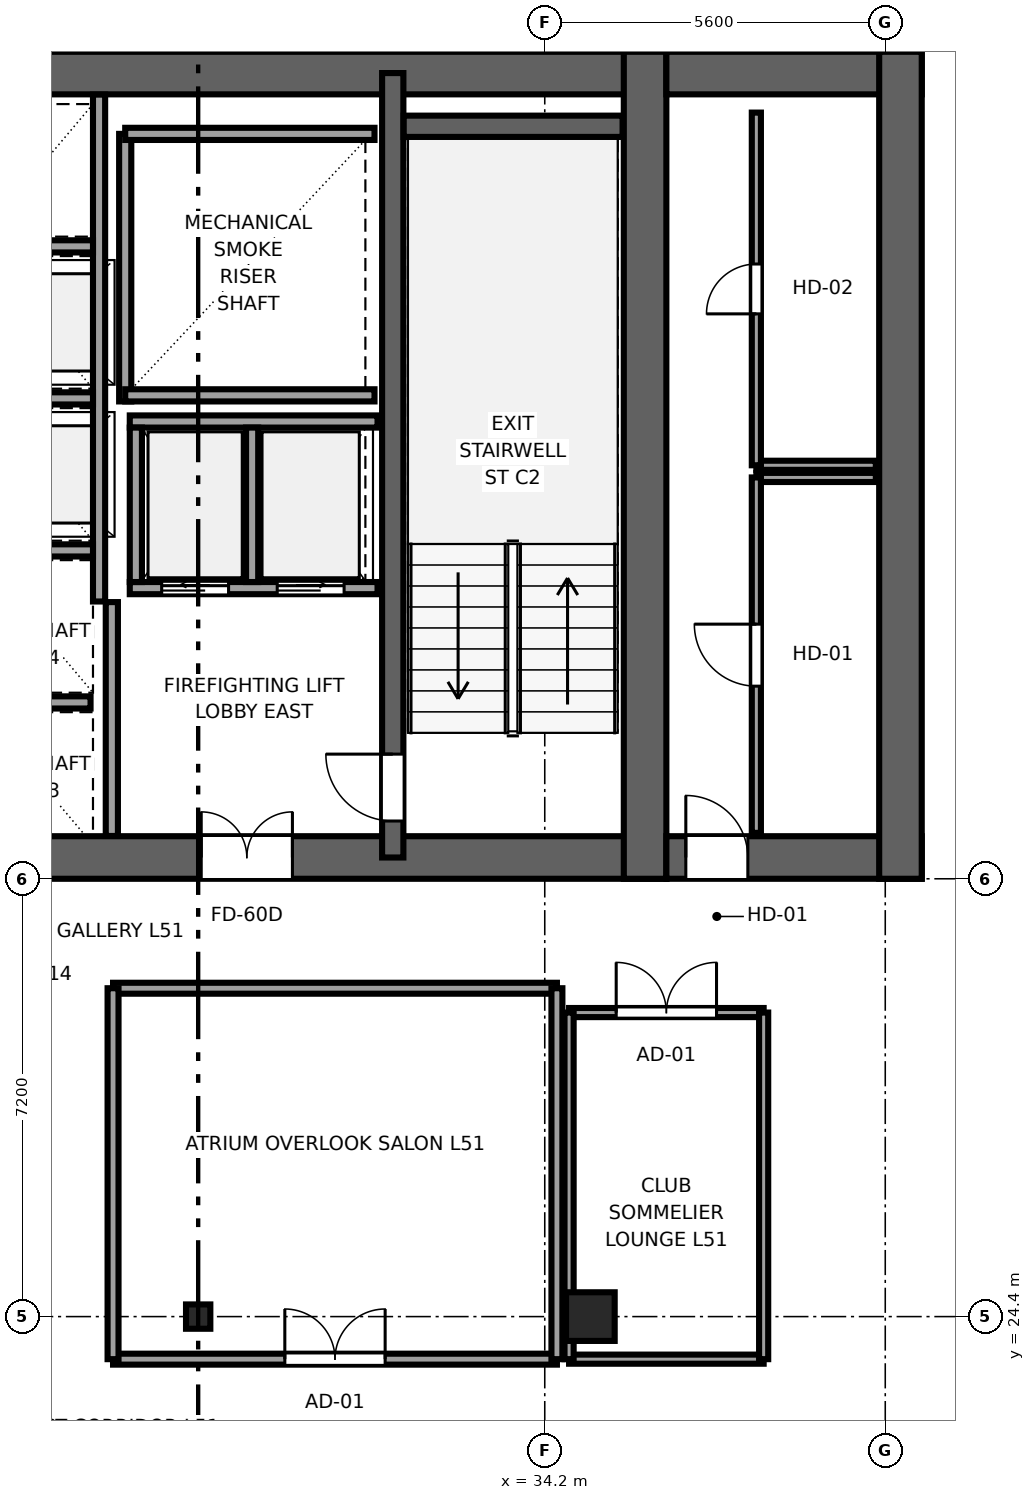
"""IFC4 building model, lengths in metres.
Left out: names, types, materials, properties, quantities, classifications, styles, units other than length and angle.
Written with IfcOpenShell. Run it as: python <this file> out.ifc"""

import sys

from ifc_helpers import new_model, si_unit, direction, frame, frame_2d, origin, origin_2d, place, context, subcontext, project, spatial, rectangle, i_section, extrude, source, transform, mapped, element, fill, save


model = new_model("IFC4")
c1 = context("Model", 3, precision=1e-05, world=origin(), true_north=direction((0.0, 1.0)))
c2 = subcontext(c1, "Body", "Model", "MODEL_VIEW")
j1 = project(units=[si_unit("LENGTHUNIT", "METRE"), si_unit("PLANEANGLEUNIT", "RADIAN")], contexts=[c1])
p1 = place(None, origin())
s1 = spatial("IfcSite", under=j1, at=p1, CompositionType="ELEMENT")
p2 = place(p1, origin())
s2 = spatial("IfcBuilding", under=s1, at=p2, CompositionType="ELEMENT")
p3 = place(p2, frame((0.0, 0.0, 194.65)))
s3 = spatial("IfcBuildingStorey", under=s2, at=p3, CompositionType="ELEMENT", Elevation=194.65)
p4 = place(p3, frame((9.8, 31.95, 0.0), z_axis=(0.0, 0.0, 1.0), x_axis=(1.0, 0.0, 0.0)))
e1 = element("IfcWall", 1, at=p4, inside=s3, PredefinedType="SHEAR", context=c2, shape_type="SweptSolid", body=[
    extrude(rectangle(XDim=26.4, YDim=0.7, at=frame_2d((13.2, 0.0))), origin(), (0.0, 0.0, 1.0), 3.55),
])
p5 = place(p4, frame((7.65, 0.0, 0.0), z_axis=(0.0, 0.0, 1.0), x_axis=(-1.0, 0.0, 0.0)))
e2 = element("IfcOpeningElement", 2, at=p5, cuts=e1, PredefinedType="OPENING", context=c2, shape_type="SweptSolid", body=[
    extrude(rectangle(XDim=1.5, YDim=2.04, at=frame_2d((0.75, 1.02))), frame((0.0, 0.36, 0.0), z_axis=(0.0, -1.0, 0.0), x_axis=(1.0, 0.0, 0.0)), (0.0, 0.0, 1.0), 0.72),
])
p6 = place(p4, frame((13.95, 0.0, 0.0), z_axis=(0.0, 0.0, 1.0), x_axis=(-1.0, 0.0, 0.0)))
e3 = element("IfcOpeningElement", 3, at=p6, cuts=e1, PredefinedType="OPENING", context=c2, shape_type="SweptSolid", body=[
    extrude(rectangle(XDim=1.5, YDim=2.04, at=frame_2d((0.75, 1.02))), frame((0.0, 0.36, 0.0), z_axis=(0.0, -1.0, 0.0), x_axis=(1.0, 0.0, 0.0)), (0.0, 0.0, 1.0), 0.72),
])
p7 = place(p4, frame((20.25, 0.0, 0.0), z_axis=(0.0, 0.0, 1.0), x_axis=(-1.0, 0.0, 0.0)))
e4 = element("IfcOpeningElement", 4, at=p7, cuts=e1, PredefinedType="OPENING", context=c2, shape_type="SweptSolid", body=[
    extrude(rectangle(XDim=1.5, YDim=2.04, at=frame_2d((0.75, 1.02))), frame((0.0, 0.36, 0.0), z_axis=(0.0, -1.0, 0.0), x_axis=(1.0, 0.0, 0.0)), (0.0, 0.0, 1.0), 0.72),
])
p8 = place(p3, frame((9.8, 44.85, 0.0), z_axis=(0.0, 0.0, 1.0), x_axis=(1.0, 0.0, 0.0)))
e5 = element("IfcWall", 5, at=p8, inside=s3, PredefinedType="SHEAR", context=c2, shape_type="SweptSolid", body=[
    extrude(rectangle(XDim=26.4, YDim=0.7, at=frame_2d((13.2, 0.0))), origin(), (0.0, 0.0, 1.0), 3.55),
])
p9 = place(p3, frame((35.85, 31.6, 0.0), z_axis=(0.0, 0.0, 1.0), x_axis=(0.0, 1.0, 0.0)))
e6 = element("IfcWall", 6, at=p9, inside=s3, PredefinedType="SHEAR", context=c2, shape_type="SweptSolid", body=[
    extrude(rectangle(XDim=13.6, YDim=0.7, at=frame_2d((6.8, 0.0))), origin(), (0.0, 0.0, 1.0), 3.55),
])
p10 = place(p3, frame((31.7, 31.95, 0.0), z_axis=(0.0, 0.0, 1.0), x_axis=(0.0, 1.0, 0.0)))
e7 = element("IfcWall", 7, at=p10, inside=s3, PredefinedType="SHEAR", context=c2, shape_type="SweptSolid", body=[
    extrude(rectangle(XDim=12.9, YDim=0.35, at=frame_2d((6.45, 0.0))), origin(), (0.0, 0.0, 1.0), 3.55),
])
p11 = place(p10, frame((1.7, 0.0, 0.0), z_axis=(0.0, 0.0, 1.0), x_axis=(-1.0, 0.0, 0.0)))
e8 = element("IfcOpeningElement", 8, at=p11, cuts=e7, PredefinedType="OPENING", context=c2, shape_type="SweptSolid", body=[
    extrude(rectangle(XDim=1.1, YDim=2.12, at=frame_2d((0.55, 1.06))), frame((0.0, 0.185, 0.0), z_axis=(0.0, -1.0, 0.0), x_axis=(1.0, 0.0, 0.0)), (0.0, 0.0, 1.0), 0.37),
])
p12 = place(p3, frame((36.2, 31.95, 0.0), z_axis=(0.0, 0.0, 1.0), x_axis=(1.0, 0.0, 0.0)))
e9 = element("IfcWall", 9, at=p12, inside=s3, PredefinedType="SHEAR", context=c2, shape_type="SweptSolid", body=[
    extrude(rectangle(XDim=4.2, YDim=0.7, at=frame_2d((2.1, 0.0))), origin(), (0.0, 0.0, 1.0), 3.55),
])
p13 = place(p12, frame((1.34, 0.0, 0.0), z_axis=(0.0, 0.0, 1.0), x_axis=(-1.0, 0.0, 0.0)))
e10 = element("IfcOpeningElement", 10, at=p13, cuts=e9, PredefinedType="OPENING", context=c2, shape_type="SweptSolid", body=[
    extrude(rectangle(XDim=1.02, YDim=2.03, at=frame_2d((0.51, 1.015))), frame((0.0, 0.36, 0.0), z_axis=(0.0, -1.0, 0.0), x_axis=(1.0, 0.0, 0.0)), (0.0, 0.0, 1.0), 0.72),
])
p14 = place(p3, frame((36.2, 44.85, 0.0), z_axis=(0.0, 0.0, 1.0), x_axis=(1.0, 0.0, 0.0)))
e11 = element("IfcWall", 11, at=p14, inside=s3, PredefinedType="SHEAR", context=c2, shape_type="SweptSolid", body=[
    extrude(rectangle(XDim=4.2, YDim=0.7, at=frame_2d((2.1, 0.0))), origin(), (0.0, 0.0, 1.0), 3.55),
])
p15 = place(p3, frame((40.05, 31.6, 0.0), z_axis=(0.0, 0.0, 1.0), x_axis=(0.0, 1.0, 0.0)))
e12 = element("IfcWall", 12, at=p15, inside=s3, PredefinedType="SHEAR", context=c2, shape_type="SweptSolid", body=[
    extrude(rectangle(XDim=13.6, YDim=0.7, at=frame_2d((6.8, 0.0))), origin(), (0.0, 0.0, 1.0), 3.55),
])
p16 = place(p3, frame((31.88, 43.975, 0.0), z_axis=(0.0, 0.0, 1.0), x_axis=(1.0, 0.0, 0.0)))
e13 = element("IfcWall", 13, at=p16, inside=s3, PredefinedType="SHEAR", context=c2, shape_type="SweptSolid", body=[
    extrude(rectangle(XDim=3.6, YDim=0.35, at=frame_2d((1.8, 0.0))), origin(), (0.0, 0.0, 1.0), 3.55),
])
m1 = source(origin(), c2, "Body", "SweptSolid", [
    extrude(rectangle(XDim=0.8, YDim=0.8, at=origin_2d()), origin(), (0.0, 0.0, 1.0), 3.55),
])
p17 = place(p3, frame((34.95, 24.4, 0.0), z_axis=(0.0, 0.0, 1.0), x_axis=(1.0, 0.0, 0.0)))
e14 = element("IfcColumn", 14, at=p17, inside=s3, PredefinedType="COLUMN", context=c2, shape_type="MappedRepresentation", body=[
    mapped(m1, transform((0.0, 0.0, 0.0), x_axis=(1.0, 0.0, 0.0), y_axis=(0.0, 1.0, 0.0), z_axis=(0.0, 0.0, 1.0), scale=1.0)),
])
m2 = source(origin(), c2, "Body", "SweptSolid", [
    extrude(i_section(OverallWidth=0.4, OverallDepth=0.4, WebThickness=0.02, FlangeThickness=0.035, at=origin_2d()), origin(), (0.0, 0.0, 1.0), 3.55),
])
p18 = place(p3, frame((28.5, 24.4, 0.0), z_axis=(0.0, 0.0, 1.0), x_axis=(1.0, 0.0, 0.0)))
e15 = element("IfcColumn", 15, at=p18, inside=s3, PredefinedType="COLUMN", context=c2, shape_type="MappedRepresentation", body=[
    mapped(m2, transform((0.0, 0.0, 0.0), x_axis=(1.0, 0.0, 0.0), y_axis=(0.0, 1.0, 0.0), z_axis=(0.0, 0.0, 1.0), scale=1.0)),
])
p19 = place(p3, frame((27.3, 39.45, 0.0), z_axis=(0.0, 0.0, 1.0), x_axis=(0.0, 1.0, 0.0)))
e16 = element("IfcWall", 16, at=p19, inside=s3, PredefinedType="SOLIDWALL", context=c2, shape_type="SweptSolid", body=[
    extrude(rectangle(XDim=4.4, YDim=0.2, at=frame_2d((2.2, 0.0))), origin(), (0.0, 0.0, 1.0), 3.37),
])
for number, where, z_axis, x_axis in (
    (17, (27.3, 39.55, 0.0), (0.0, 0.0, 1.0), (1.0, 0.0, 0.0)),
    (18, (27.3, 43.85, 0.0), (0.0, 0.0, 1.0), (1.0, 0.0, 0.0)),
):
    element("IfcWall", number, at=place(p3, frame(where, z_axis=z_axis, x_axis=x_axis)), inside=s3, PredefinedType="SOLIDWALL", context=c2, shape_type="SweptSolid", body=[
        extrude(rectangle(XDim=4.1, YDim=0.2, at=frame_2d((2.05, 0.0))), origin(), (0.0, 0.0, 1.0), 3.37),
    ])
p20 = place(p3, frame((27.08, 32.304, 0.0), z_axis=(0.0, 0.0, 1.0), x_axis=(0.0, 1.0, 0.0)))
e19 = element("IfcWall", 19, at=p20, inside=s3, PredefinedType="SOLIDWALL", context=c2, shape_type="SweptSolid", body=[
    extrude(rectangle(XDim=3.846, YDim=0.2, at=frame_2d((1.923, 0.0))), origin(), (0.0, 0.0, 1.0), 3.37),
])
p21 = place(p3, frame((27.375, 36.38, 0.0), z_axis=(0.0, 0.0, 1.0), x_axis=(1.0, 0.0, 0.0)))
e20 = element("IfcWall", 20, at=p21, inside=s3, PredefinedType="SOLIDWALL", context=c2, shape_type="SweptSolid", body=[
    extrude(rectangle(XDim=4.075, YDim=0.2, at=frame_2d((2.038, 0.0))), origin(), (0.0, 0.0, 1.0), 3.37),
])
p22 = place(p21, frame((0.525, 0.0, 0.0)))
e21 = element("IfcOpeningElement", 21, at=p22, cuts=e20, PredefinedType="OPENING", context=c2, shape_type="SweptSolid", body=[
    extrude(rectangle(XDim=1.1, YDim=2.12, at=frame_2d((0.55, 1.06))), frame((0.0, 0.11, 0.0), z_axis=(0.0, -1.0, 0.0), x_axis=(1.0, 0.0, 0.0)), (0.0, 0.0, 1.0), 0.22),
])
p23 = place(p21, frame((2.425, 0.0, 0.0)))
e22 = element("IfcOpeningElement", 22, at=p23, cuts=e20, PredefinedType="OPENING", context=c2, shape_type="SweptSolid", body=[
    extrude(rectangle(XDim=1.1, YDim=2.12, at=frame_2d((0.55, 1.06))), frame((0.0, 0.11, 0.0), z_axis=(0.0, -1.0, 0.0), x_axis=(1.0, 0.0, 0.0)), (0.0, 0.0, 1.0), 0.22),
])
p24 = place(p3, frame((27.375, 39.12, 0.0), z_axis=(0.0, 0.0, 1.0), x_axis=(1.0, 0.0, 0.0)))
e23 = element("IfcWall", 23, at=p24, inside=s3, PredefinedType="SOLIDWALL", context=c2, shape_type="SweptSolid", body=[
    extrude(rectangle(XDim=4.075, YDim=0.2, at=frame_2d((2.038, 0.0))), origin(), (0.0, 0.0, 1.0), 3.37),
])
for number, where, z_axis, x_axis in (
    (24, (27.475, 36.48, 0.0), (0.0, 0.0, 1.0), (0.0, 1.0, 0.0)),
    (25, (29.387, 36.48, 0.0), (0.0, 0.0, 1.0), (0.0, 1.0, 0.0)),
):
    element("IfcWall", number, at=place(p3, frame(where, z_axis=z_axis, x_axis=x_axis)), inside=s3, PredefinedType="SOLIDWALL", context=c2, shape_type="SweptSolid", body=[
        extrude(rectangle(XDim=2.54, YDim=0.2, at=frame_2d((1.27, 0.0))), origin(), (0.0, 0.0, 1.0), 3.37),
    ])
p25 = place(p3, frame((26.87, 36.16, 0.0), z_axis=(0.0, 0.0, 1.0), x_axis=(0.0, 1.0, 0.0)))
e26 = element("IfcWall", 26, at=p25, inside=s3, PredefinedType="SOLIDWALL", context=c2, shape_type="SweptSolid", body=[
    extrude(rectangle(XDim=8.336, YDim=0.2, at=frame_2d((4.168, 0.0))), origin(), (0.0, 0.0, 1.0), 3.37),
])
p26 = place(p3, frame((24.93, 34.5, 0.0), z_axis=(0.0, 0.0, 1.0), x_axis=(1.0, 0.0, 0.0)))
e27 = element("IfcWall", 27, at=p26, inside=s3, PredefinedType="SOLIDWALL", context=c2, shape_type="SweptSolid", body=[
    extrude(rectangle(XDim=1.8, YDim=0.2, at=frame_2d((0.9, 0.0))), origin(), (0.0, 0.0, 1.0), 3.37),
])
for number, where, z_axis, x_axis in (
    (28, (24.93, 37.0, 0.0), (0.0, 0.0, 1.0), (1.0, 0.0, 0.0)),
    (29, (24.93, 39.5, 0.0), (0.0, 0.0, 1.0), (1.0, 0.0, 0.0)),
    (30, (24.93, 42.0, 0.0), (0.0, 0.0, 1.0), (1.0, 0.0, 0.0)),
):
    element("IfcWall", number, at=place(p3, frame(where, z_axis=z_axis, x_axis=x_axis)), inside=s3, PredefinedType="SOLIDWALL", context=c2, shape_type="SweptSolid", body=[
        extrude(rectangle(XDim=1.84, YDim=0.2, at=frame_2d((0.92, 0.0))), origin(), (0.0, 0.0, 1.0), 3.37),
    ])
p27 = place(p3, frame((37.68, 38.2, 0.0), z_axis=(0.0, 0.0, 1.0), x_axis=(1.0, 0.0, 0.0)))
e31 = element("IfcWall", 31, at=p27, inside=s3, PredefinedType="PARTITIONING", context=c2, shape_type="SweptSolid", body=[
    extrude(rectangle(XDim=1.965, YDim=0.15, at=frame_2d((0.982, 0.0))), origin(), (0.0, 0.0, 1.0), 3.37),
])
p28 = place(p3, frame((37.68, 32.355, 0.0), z_axis=(0.0, 0.0, 1.0), x_axis=(0.0, 1.0, 0.0)))
e32 = element("IfcWall", 32, at=p28, inside=s3, PredefinedType="PARTITIONING", context=c2, shape_type="SweptSolid", body=[
    extrude(rectangle(XDim=5.845, YDim=0.15, at=frame_2d((2.922, 0.0))), origin(), (0.0, 0.0, 1.0), 3.37),
])
p29 = place(p28, frame((2.413, 0.0, 0.0)))
e33 = element("IfcOpeningElement", 33, at=p29, cuts=e32, PredefinedType="OPENING", context=c2, shape_type="SweptSolid", body=[
    extrude(rectangle(XDim=1.02, YDim=2.03, at=frame_2d((0.51, 1.015))), frame((0.0, 0.085, 0.0), z_axis=(0.0, -1.0, 0.0), x_axis=(1.0, 0.0, 0.0)), (0.0, 0.0, 1.0), 0.17),
])
p30 = place(p3, frame((37.68, 38.4, 0.0), z_axis=(0.0, 0.0, 1.0), x_axis=(1.0, 0.0, 0.0)))
e34 = element("IfcWall", 34, at=p30, inside=s3, PredefinedType="PARTITIONING", context=c2, shape_type="SweptSolid", body=[
    extrude(rectangle(XDim=1.965, YDim=0.15, at=frame_2d((0.982, 0.0))), origin(), (0.0, 0.0, 1.0), 3.37),
])
p31 = place(p3, frame((37.68, 38.4, 0.0), z_axis=(0.0, 0.0, 1.0), x_axis=(0.0, 1.0, 0.0)))
e35 = element("IfcWall", 35, at=p31, inside=s3, PredefinedType="PARTITIONING", context=c2, shape_type="SweptSolid", body=[
    extrude(rectangle(XDim=5.8, YDim=0.15, at=frame_2d((2.9, 0.0))), origin(), (0.0, 0.0, 1.0), 3.37),
])
p32 = place(p31, frame((2.49, 0.0, 0.0)))
e36 = element("IfcOpeningElement", 36, at=p32, cuts=e35, PredefinedType="OPENING", context=c2, shape_type="SweptSolid", body=[
    extrude(rectangle(XDim=0.82, YDim=2.01, at=frame_2d((0.41, 1.005))), frame((0.0, 0.085, 0.0), z_axis=(0.0, -1.0, 0.0), x_axis=(1.0, 0.0, 0.0)), (0.0, 0.0, 1.0), 0.17),
])
p33 = place(p3, frame((27.1, 23.7, 0.0), z_axis=(0.0, 0.0, 1.0), x_axis=(1.0, 0.0, 0.0)))
e37 = element("IfcWall", 37, at=p33, inside=s3, PredefinedType="PARTITIONING", context=c2, shape_type="SweptSolid", body=[
    extrude(rectangle(XDim=7.3, YDim=0.18, at=frame_2d((3.65, 0.0))), origin(), (0.0, 0.0, 1.0), 3.37),
])
p34 = place(p33, frame((2.825, 0.0, 0.0)))
e38 = element("IfcOpeningElement", 38, at=p34, cuts=e37, PredefinedType="OPENING", context=c2, shape_type="SweptSolid", body=[
    extrude(rectangle(XDim=1.65, YDim=2.15, at=frame_2d((0.825, 1.075))), frame((0.0, 0.1, 0.0), z_axis=(0.0, -1.0, 0.0), x_axis=(1.0, 0.0, 0.0)), (0.0, 0.0, 1.0), 0.2),
])
p35 = place(p3, frame((27.1, 29.8, 0.0), z_axis=(0.0, 0.0, 1.0), x_axis=(1.0, 0.0, 0.0)))
e39 = element("IfcWall", 39, at=p35, inside=s3, PredefinedType="PARTITIONING", context=c2, shape_type="SweptSolid", body=[
    extrude(rectangle(XDim=7.3, YDim=0.18, at=frame_2d((3.65, 0.0))), origin(), (0.0, 0.0, 1.0), 3.37),
])
for number, where, z_axis, x_axis in (
    (40, (27.1, 23.7, 0.0), (0.0, 0.0, 1.0), (0.0, 1.0, 0.0)),
    (41, (34.4, 23.7, 0.0), (0.0, 0.0, 1.0), (0.0, 1.0, 0.0)),
):
    element("IfcWall", number, at=place(p3, frame(where, z_axis=z_axis, x_axis=x_axis)), inside=s3, PredefinedType="PARTITIONING", context=c2, shape_type="SweptSolid", body=[
        extrude(rectangle(XDim=6.1, YDim=0.18, at=frame_2d((3.05, 0.0))), origin(), (0.0, 0.0, 1.0), 3.37),
    ])
p36 = place(p3, frame((34.6, 23.7, 0.0), z_axis=(0.0, 0.0, 1.0), x_axis=(1.0, 0.0, 0.0)))
e42 = element("IfcWall", 42, at=p36, inside=s3, PredefinedType="PARTITIONING", context=c2, shape_type="SweptSolid", body=[
    extrude(rectangle(XDim=3.2, YDim=0.15, at=frame_2d((1.6, 0.0))), origin(), (0.0, 0.0, 1.0), 3.37),
])
p37 = place(p3, frame((34.6, 29.4, 0.0), z_axis=(0.0, 0.0, 1.0), x_axis=(1.0, 0.0, 0.0)))
e43 = element("IfcWall", 43, at=p37, inside=s3, PredefinedType="PARTITIONING", context=c2, shape_type="SweptSolid", body=[
    extrude(rectangle(XDim=3.2, YDim=0.15, at=frame_2d((1.6, 0.0))), origin(), (0.0, 0.0, 1.0), 3.37),
])
p38 = place(p37, frame((0.775, 0.0, 0.0)))
e44 = element("IfcOpeningElement", 44, at=p38, cuts=e43, PredefinedType="OPENING", context=c2, shape_type="SweptSolid", body=[
    extrude(rectangle(XDim=1.65, YDim=2.15, at=frame_2d((0.825, 1.075))), frame((0.0, 0.085, 0.0), z_axis=(0.0, -1.0, 0.0), x_axis=(1.0, 0.0, 0.0)), (0.0, 0.0, 1.0), 0.17),
])
for number, where, z_axis, x_axis in (
    (45, (34.6, 23.7, 0.0), (0.0, 0.0, 1.0), (0.0, 1.0, 0.0)),
    (46, (37.8, 23.7, 0.0), (0.0, 0.0, 1.0), (0.0, 1.0, 0.0)),
):
    element("IfcWall", number, at=place(p3, frame(where, z_axis=z_axis, x_axis=x_axis)), inside=s3, PredefinedType="PARTITIONING", context=c2, shape_type="SweptSolid", body=[
        extrude(rectangle(XDim=5.7, YDim=0.15, at=frame_2d((2.85, 0.0))), origin(), (0.0, 0.0, 1.0), 3.37),
    ])
m3 = source(origin(), c2, "Body", "SweptSolid", [
    extrude(rectangle(XDim=1.1, YDim=2.12, at=frame_2d((0.55, 1.06))), frame((0.0, 0.025, 0.0), z_axis=(0.0, -1.0, 0.0), x_axis=(1.0, 0.0, 0.0)), (0.0, 0.0, 1.0), 0.05),
])
p39 = place(p11, origin())
e47 = element("IfcDoor", 47, at=p39, inside=s3, OperationType="SINGLE_SWING_RIGHT", PredefinedType="DOOR", context=c2, shape_type="MappedRepresentation", body=[
    mapped(m3, transform((0.0, 0.0, 0.0), x_axis=(1.0, 0.0, 0.0), y_axis=(0.0, 1.0, 0.0), z_axis=(0.0, 0.0, 1.0), scale=1.0)),
])
fill(e8, e47)
m4 = source(origin(), c2, "Body", "SweptSolid", [
    extrude(rectangle(XDim=1.5, YDim=2.04, at=frame_2d((0.75, 1.02))), frame((0.0, 0.025, 0.0), z_axis=(0.0, -1.0, 0.0), x_axis=(1.0, 0.0, 0.0)), (0.0, 0.0, 1.0), 0.05),
])
p40 = place(p7, origin())
e48 = element("IfcDoor", 48, at=p40, inside=s3, OperationType="DOUBLE_DOOR_SINGLE_SWING", PredefinedType="DOOR", context=c2, shape_type="MappedRepresentation", body=[
    mapped(m4, transform((0.0, 0.0, 0.0), x_axis=(1.0, 0.0, 0.0), y_axis=(0.0, 1.0, 0.0), z_axis=(0.0, 0.0, 1.0), scale=1.0)),
])
fill(e4, e48)
m5 = source(origin(), c2, "Body", "SweptSolid", [
    extrude(rectangle(XDim=1.02, YDim=2.03, at=frame_2d((0.51, 1.015))), frame((0.0, 0.025, 0.0), z_axis=(0.0, -1.0, 0.0), x_axis=(1.0, 0.0, 0.0)), (0.0, 0.0, 1.0), 0.05),
])
p41 = place(p13, origin())
e49 = element("IfcDoor", 49, at=p41, inside=s3, OperationType="SINGLE_SWING_LEFT", PredefinedType="DOOR", context=c2, shape_type="MappedRepresentation", body=[
    mapped(m5, transform((0.0, 0.0, 0.0), x_axis=(1.0, 0.0, 0.0), y_axis=(0.0, 1.0, 0.0), z_axis=(0.0, 0.0, 1.0), scale=1.0)),
])
fill(e10, e49)
m6 = source(origin(), c2, "Body", "SweptSolid", [
    extrude(rectangle(XDim=1.1, YDim=2.12, at=frame_2d((0.55, 1.06))), frame((0.0, 0.025, 0.0), z_axis=(0.0, -1.0, 0.0), x_axis=(1.0, 0.0, 0.0)), (0.0, 0.0, 1.0), 0.05),
])
p42 = place(p22, origin())
e50 = element("IfcDoor", 50, at=p42, inside=s3, OperationType="SLIDING_TO_LEFT", PredefinedType="DOOR", context=c2, shape_type="MappedRepresentation", body=[
    mapped(m6, transform((0.0, 0.0, 0.0), x_axis=(1.0, 0.0, 0.0), y_axis=(0.0, 1.0, 0.0), z_axis=(0.0, 0.0, 1.0), scale=1.0)),
])
fill(e21, e50)
p43 = place(p23, origin())
e51 = element("IfcDoor", 51, at=p43, inside=s3, OperationType="SLIDING_TO_RIGHT", PredefinedType="DOOR", context=c2, shape_type="MappedRepresentation", body=[
    mapped(m6, transform((0.0, 0.0, 0.0), x_axis=(1.0, 0.0, 0.0), y_axis=(0.0, 1.0, 0.0), z_axis=(0.0, 0.0, 1.0), scale=1.0)),
])
fill(e22, e51)
p44 = place(p29, origin())
e52 = element("IfcDoor", 52, at=p44, inside=s3, OperationType="SINGLE_SWING_RIGHT", PredefinedType="DOOR", context=c2, shape_type="MappedRepresentation", body=[
    mapped(m5, transform((0.0, 0.0, 0.0), x_axis=(1.0, 0.0, 0.0), y_axis=(0.0, 1.0, 0.0), z_axis=(0.0, 0.0, 1.0), scale=1.0)),
])
fill(e33, e52)
m7 = source(origin(), c2, "Body", "SweptSolid", [
    extrude(rectangle(XDim=0.82, YDim=2.01, at=frame_2d((0.41, 1.005))), frame((0.0, 0.025, 0.0), z_axis=(0.0, -1.0, 0.0), x_axis=(1.0, 0.0, 0.0)), (0.0, 0.0, 1.0), 0.05),
])
p45 = place(p32, origin())
e53 = element("IfcDoor", 53, at=p45, inside=s3, OperationType="SINGLE_SWING_LEFT", PredefinedType="DOOR", context=c2, shape_type="MappedRepresentation", body=[
    mapped(m7, transform((0.0, 0.0, 0.0), x_axis=(1.0, 0.0, 0.0), y_axis=(0.0, 1.0, 0.0), z_axis=(0.0, 0.0, 1.0), scale=1.0)),
])
fill(e36, e53)
m8 = source(origin(), c2, "Body", "SweptSolid", [
    extrude(rectangle(XDim=1.65, YDim=2.15, at=frame_2d((0.825, 1.075))), frame((0.0, 0.025, 0.0), z_axis=(0.0, -1.0, 0.0), x_axis=(1.0, 0.0, 0.0)), (0.0, 0.0, 1.0), 0.05),
])
p46 = place(p34, origin())
e54 = element("IfcDoor", 54, at=p46, inside=s3, OperationType="DOUBLE_DOOR_SINGLE_SWING", PredefinedType="DOOR", context=c2, shape_type="MappedRepresentation", body=[
    mapped(m8, transform((0.0, 0.0, 0.0), x_axis=(1.0, 0.0, 0.0), y_axis=(0.0, 1.0, 0.0), z_axis=(0.0, 0.0, 1.0), scale=1.0)),
])
fill(e38, e54)
p47 = place(p38, origin())
e55 = element("IfcDoor", 55, at=p47, inside=s3, OperationType="DOUBLE_DOOR_SINGLE_SWING", PredefinedType="DOOR", context=c2, shape_type="MappedRepresentation", body=[
    mapped(m8, transform((0.0, 0.0, 0.0), x_axis=(1.0, 0.0, 0.0), y_axis=(0.0, 1.0, 0.0), z_axis=(0.0, 0.0, 1.0), scale=1.0)),
])
fill(e44, e55)
save(model, sys.argv[1])
